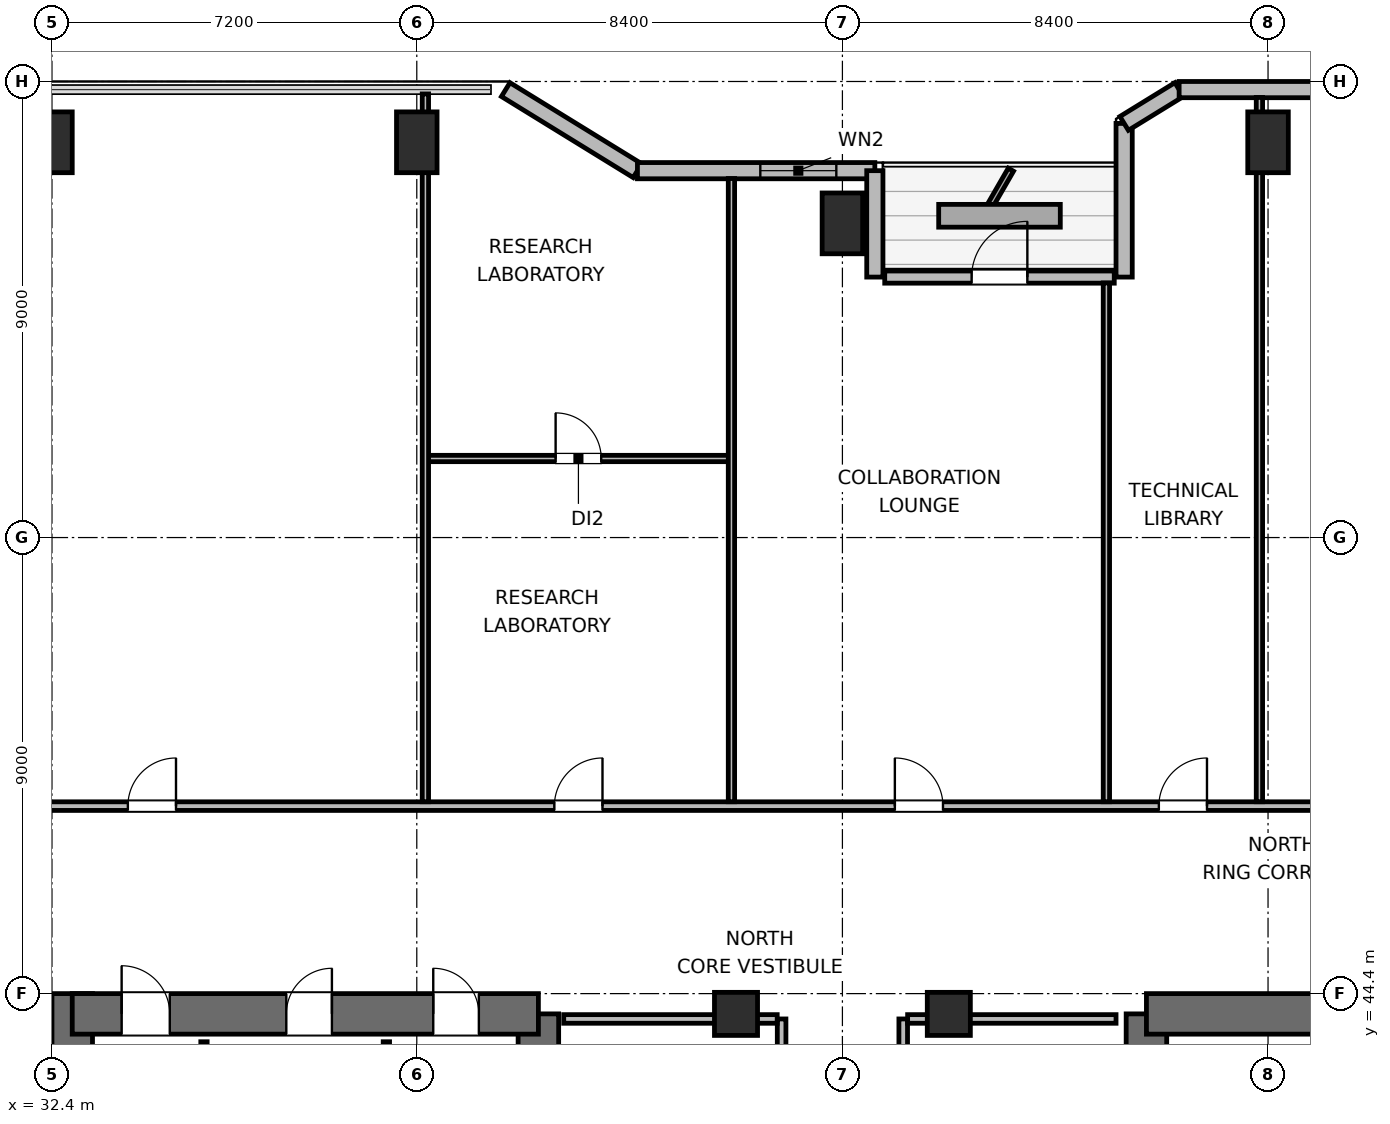
"""IFC4 building model, lengths in metres.
Left out: names, types, materials, properties, quantities, classifications, styles, units other than length and angle.
Written with IfcOpenShell. Run it as: python <this file> out.ifc"""

import sys

from ifc_helpers import new_model, si_unit, direction, frame, frame_2d, origin, origin_2d, place, context, subcontext, project, spatial, rectangle, extrude, element, fill, save


model = new_model("IFC4")
c1 = context("Model", 3, precision=1e-05, world=origin(), true_north=direction((0.0, 1.0)))
c2 = subcontext(c1, "Body", "Model", "MODEL_VIEW")
j1 = project(units=[si_unit("LENGTHUNIT", "METRE"), si_unit("PLANEANGLEUNIT", "RADIAN")], contexts=[c1])
p1 = place(None, origin())
s1 = spatial("IfcSite", under=j1, at=p1, CompositionType="ELEMENT")
p2 = place(p1, origin())
s2 = spatial("IfcBuilding", under=s1, at=p2, CompositionType="ELEMENT")
p3 = place(p2, frame((0.0, 0.0, 97.5)))
s3 = spatial("IfcBuildingStorey", under=s2, at=p3, CompositionType="ELEMENT", Elevation=97.5)
p4 = place(p3, frame((32.8, 27.6, 0.0), z_axis=(0.0, 0.0, 1.0), x_axis=(0.0, 1.0, 0.0)))
e1 = element("IfcWall", 1, at=p4, inside=s3, PredefinedType="SHEAR", context=c2, shape_type="SweptSolid", body=[
    extrude(rectangle(XDim=16.8, YDim=0.8, at=frame_2d((8.4, 0.0))), origin(), (0.0, 0.0, 1.0), 3.9),
])
p5 = place(p3, frame((42.0, 37.8, 0.0), z_axis=(0.0, 0.0, 1.0), x_axis=(0.0, 1.0, 0.0)))
e2 = element("IfcWall", 2, at=p5, inside=s3, PredefinedType="SHEAR", context=c2, shape_type="SweptSolid", body=[
    extrude(rectangle(XDim=6.2, YDim=0.8, at=frame_2d((3.1, 0.0))), origin(), (0.0, 0.0, 1.0), 3.9),
])
p6 = place(p3, frame((32.8, 44.0, 0.0), z_axis=(0.0, 0.0, 1.0), x_axis=(1.0, 0.0, 0.0)))
e3 = element("IfcWall", 3, at=p6, inside=s3, PredefinedType="SHEAR", context=c2, shape_type="SweptSolid", body=[
    extrude(rectangle(XDim=9.2, YDim=0.8, at=frame_2d((4.6, 0.0))), origin(), (0.0, 0.0, 1.0), 3.9),
])
p7 = place(p6, frame((0.975, 0.0, 0.0)))
e4 = element("IfcOpeningElement", 4, at=p7, cuts=e3, PredefinedType="OPENING", context=c2, shape_type="SweptSolid", body=[
    extrude(rectangle(XDim=0.95, YDim=2.04, at=frame_2d((0.475, 1.02))), frame((0.0, 0.41, 0.0), z_axis=(0.0, -1.0, 0.0), x_axis=(1.0, 0.0, 0.0)), (0.0, 0.0, 1.0), 0.82),
])
p8 = place(p6, frame((4.225, 0.0, 0.0)))
e5 = element("IfcOpeningElement", 5, at=p8, cuts=e3, PredefinedType="OPENING", context=c2, shape_type="SweptSolid", body=[
    extrude(rectangle(XDim=0.9, YDim=2.02, at=frame_2d((0.45, 1.01))), frame((0.0, 0.41, 0.0), z_axis=(0.0, -1.0, 0.0), x_axis=(1.0, 0.0, 0.0)), (0.0, 0.0, 1.0), 0.82),
])
p9 = place(p6, frame((7.125, 0.0, 0.0)))
e6 = element("IfcOpeningElement", 6, at=p9, cuts=e3, PredefinedType="OPENING", context=c2, shape_type="SweptSolid", body=[
    extrude(rectangle(XDim=0.9, YDim=2.02, at=frame_2d((0.45, 1.01))), frame((0.0, 0.41, 0.0), z_axis=(0.0, -1.0, 0.0), x_axis=(1.0, 0.0, 0.0)), (0.0, 0.0, 1.0), 0.82),
])
p10 = place(p3, frame((54.0, 38.0, 0.0), z_axis=(0.0, 0.0, 1.0), x_axis=(0.0, 1.0, 0.0)))
e7 = element("IfcWall", 7, at=p10, inside=s3, PredefinedType="SHEAR", context=c2, shape_type="SweptSolid", body=[
    extrude(rectangle(XDim=6.0, YDim=0.8, at=frame_2d((3.0, 0.0))), origin(), (0.0, 0.0, 1.0), 3.9),
])
p11 = place(p3, frame((54.0, 44.0, 0.0), z_axis=(0.0, 0.0, 1.0), x_axis=(1.0, 0.0, 0.0)))
e8 = element("IfcWall", 8, at=p11, inside=s3, PredefinedType="SHEAR", context=c2, shape_type="SweptSolid", body=[
    extrude(rectangle(XDim=9.2, YDim=0.8, at=frame_2d((4.6, 0.0))), origin(), (0.0, 0.0, 1.0), 3.9),
])
for number, where, z_axis, x_axis in (
    (9, (32.4, 61.2, 0.0), (0.0, 0.0, 1.0), (1.0, 0.0, 0.0)),
    (10, (39.6, 61.2, 0.0), (0.0, 0.0, 1.0), (1.0, 0.0, 0.0)),
    (11, (48.0, 59.6, 0.0), (0.0, 0.0, 1.0), (1.0, 0.0, 0.0)),
    (12, (56.4, 61.2, 0.0), (0.0, 0.0, 1.0), (1.0, 0.0, 0.0)),
):
    element("IfcColumn", number, at=place(p3, frame(where, z_axis=z_axis, x_axis=x_axis)), inside=s3, PredefinedType="COLUMN", context=c2, shape_type="SweptSolid", body=[
        extrude(rectangle(XDim=0.8, YDim=1.2, at=origin_2d()), origin(), (0.0, 0.0, 1.0), 3.9),
    ])
for number, where, z_axis, x_axis in (
    (13, (45.9, 44.0, 0.0), (0.0, 0.0, 1.0), (1.0, 0.0, 0.0)),
    (14, (50.1, 44.0, 0.0), (0.0, 0.0, 1.0), (1.0, 0.0, 0.0)),
):
    element("IfcColumn", number, at=place(p3, frame(where, z_axis=z_axis, x_axis=x_axis)), inside=s3, PredefinedType="COLUMN", context=c2, shape_type="SweptSolid", body=[
        extrude(rectangle(XDim=0.85, YDim=0.85, at=origin_2d()), origin(), (0.0, 0.0, 1.0), 3.9),
    ])
p12 = place(p3, frame((41.355, 62.24, 0.0), z_axis=(0.0, 0.0, 1.0), x_axis=(0.851630857047, -0.524142044989, 0.0)))
e15 = element("IfcWall", 15, at=p12, inside=s3, PredefinedType="SOLIDWALL", context=c2, shape_type="SweptSolid", body=[
    extrude(rectangle(XDim=3.053, YDim=0.32, at=frame_2d((1.526, 0.0))), origin(), (0.0, 0.0, 1.0), 2.875),
])
p13 = place(p3, frame((43.955, 60.64, 0.0), z_axis=(0.0, 0.0, 1.0), x_axis=(1.0, 0.0, 0.0)))
e16 = element("IfcWall", 16, at=p13, inside=s3, PredefinedType="SOLIDWALL", context=c2, shape_type="SweptSolid", body=[
    extrude(rectangle(XDim=4.685, YDim=0.32, at=frame_2d((2.343, 0.0))), origin(), (0.0, 0.0, 1.0), 2.875),
])
p14 = place(p13, frame((2.425, 0.0, 0.85)))
e17 = element("IfcOpeningElement", 17, at=p14, cuts=e16, PredefinedType="OPENING", context=c2, shape_type="SweptSolid", body=[
    extrude(rectangle(XDim=1.5, YDim=1.1, at=frame_2d((0.75, 0.55))), frame((0.0, 0.17, 0.0), z_axis=(0.0, -1.0, 0.0), x_axis=(1.0, 0.0, 0.0)), (0.0, 0.0, 1.0), 0.34),
])
p15 = place(p3, frame((48.64, 60.64, 0.0), z_axis=(0.0, 0.0, 1.0), x_axis=(0.0, -1.0, 0.0)))
e18 = element("IfcWall", 18, at=p15, inside=s3, PredefinedType="SOLIDWALL", context=c2, shape_type="SweptSolid", body=[
    extrude(rectangle(XDim=2.1, YDim=0.32, at=frame_2d((1.05, 0.0))), origin(), (0.0, 0.0, 1.0), 2.875),
])
p16 = place(p3, frame((48.835, 58.54, 0.0), z_axis=(0.0, 0.0, 1.0), x_axis=(1.0, 0.0, 0.0)))
e19 = element("IfcWall", 19, at=p16, inside=s3, PredefinedType="SOLIDWALL", context=c2, shape_type="SweptSolid", body=[
    extrude(rectangle(XDim=4.53, YDim=0.24, at=frame_2d((2.265, 0.0))), origin(), (0.0, 0.0, 1.0), 3.64),
])
p17 = place(p16, frame((1.715, 0.0, 0.0)))
e20 = element("IfcOpeningElement", 20, at=p17, cuts=e19, PredefinedType="OPENING", context=c2, shape_type="SweptSolid", body=[
    extrude(rectangle(XDim=1.1, YDim=2.04, at=frame_2d((0.55, 1.02))), frame((0.0, 0.13, 0.0), z_axis=(0.0, -1.0, 0.0), x_axis=(1.0, 0.0, 0.0)), (0.0, 0.0, 1.0), 0.26),
])
p18 = place(p3, frame((53.56, 58.54, 0.0), z_axis=(0.0, 0.0, 1.0), x_axis=(0.0, 1.0, 0.0)))
e21 = element("IfcWall", 21, at=p18, inside=s3, PredefinedType="SOLIDWALL", context=c2, shape_type="SweptSolid", body=[
    extrude(rectangle(XDim=3.032, YDim=0.32, at=frame_2d((1.516, 0.0))), origin(), (0.0, 0.0, 1.0), 2.875),
])
p19 = place(p3, frame((53.56, 61.573, 0.0), z_axis=(0.0, 0.0, 1.0), x_axis=(0.851776724646, 0.523904964045, 0.0)))
e22 = element("IfcWall", 22, at=p19, inside=s3, PredefinedType="SOLIDWALL", context=c2, shape_type="SweptSolid", body=[
    extrude(rectangle(XDim=1.274, YDim=0.32, at=frame_2d((0.637, 0.0))), origin(), (0.0, 0.0, 1.0), 3.64),
])
p20 = place(p3, frame((54.645, 62.24, 0.0), z_axis=(0.0, 0.0, 1.0), x_axis=(1.0, 0.0, 0.0)))
e23 = element("IfcWall", 23, at=p20, inside=s3, PredefinedType="SOLIDWALL", context=c2, shape_type="SweptSolid", body=[
    extrude(rectangle(XDim=10.734, YDim=0.32, at=frame_2d((5.367, 0.0))), origin(), (0.0, 0.0, 1.0), 3.64),
])
for number, where, z_axis, x_axis in (
    (24, (35.4, 41.095, 0.0), (0.0, 0.0, 1.0), (0.0, 1.0, 0.0)),
    (25, (39.0, 41.095, 0.0), (0.0, 0.0, 1.0), (0.0, 1.0, 0.0)),
):
    element("IfcWall", number, at=place(p3, frame(where, z_axis=z_axis, x_axis=x_axis)), inside=s3, PredefinedType="PARTITIONING", context=c2, shape_type="SweptSolid", body=[
        extrude(rectangle(XDim=2.355, YDim=0.125, at=frame_2d((1.177, 0.0))), origin(), (0.0, 0.0, 1.0), 3.64),
    ])
p21 = place(p3, frame((46.8, 37.9, 0.0), z_axis=(0.0, 0.0, 1.0), x_axis=(0.0, 1.0, 0.0)))
e26 = element("IfcWall", 26, at=p21, inside=s3, PredefinedType="PARTITIONING", context=c2, shape_type="SweptSolid", body=[
    extrude(rectangle(XDim=6.0, YDim=0.17, at=frame_2d((3.0, 0.0))), origin(), (0.0, 0.0, 1.0), 3.64),
])
p22 = place(p21, frame((0.54, 0.0, 0.0)))
e27 = element("IfcOpeningElement", 27, at=p22, cuts=e26, PredefinedType="OPENING", context=c2, shape_type="SweptSolid", body=[
    extrude(rectangle(XDim=0.9, YDim=2.02, at=frame_2d((0.45, 1.01))), frame((0.0, 0.095, 0.0), z_axis=(0.0, -1.0, 0.0), x_axis=(1.0, 0.0, 0.0)), (0.0, 0.0, 1.0), 0.19),
])
p23 = place(p21, frame((2.55, 0.0, 0.0)))
e28 = element("IfcOpeningElement", 28, at=p23, cuts=e26, PredefinedType="OPENING", context=c2, shape_type="SweptSolid", body=[
    extrude(rectangle(XDim=0.9, YDim=2.02, at=frame_2d((0.45, 1.01))), frame((0.0, 0.095, 0.0), z_axis=(0.0, -1.0, 0.0), x_axis=(1.0, 0.0, 0.0)), (0.0, 0.0, 1.0), 0.19),
])
p24 = place(p21, frame((4.56, 0.0, 0.0)))
e29 = element("IfcOpeningElement", 29, at=p24, cuts=e26, PredefinedType="OPENING", context=c2, shape_type="SweptSolid", body=[
    extrude(rectangle(XDim=0.9, YDim=2.02, at=frame_2d((0.45, 1.01))), frame((0.0, 0.095, 0.0), z_axis=(0.0, -1.0, 0.0), x_axis=(1.0, 0.0, 0.0)), (0.0, 0.0, 1.0), 0.19),
])
p25 = place(p3, frame((42.5, 43.9, 0.0), z_axis=(0.0, 0.0, 1.0), x_axis=(1.0, 0.0, 0.0)))
e30 = element("IfcWall", 30, at=p25, inside=s3, PredefinedType="PARTITIONING", context=c2, shape_type="SweptSolid", body=[
    extrude(rectangle(XDim=4.213, YDim=0.17, at=frame_2d((2.106, 0.0))), origin(), (0.0, 0.0, 1.0), 2.525),
])
p26 = place(p3, frame((49.2, 37.9, 0.0), z_axis=(0.0, 0.0, 1.0), x_axis=(0.0, 1.0, 0.0)))
e31 = element("IfcWall", 31, at=p26, inside=s3, PredefinedType="PARTITIONING", context=c2, shape_type="SweptSolid", body=[
    extrude(rectangle(XDim=6.0, YDim=0.17, at=frame_2d((3.0, 0.0))), origin(), (0.0, 0.0, 1.0), 3.64),
])
p27 = place(p26, frame((0.69, 0.0, 0.0)))
e32 = element("IfcOpeningElement", 32, at=p27, cuts=e31, PredefinedType="OPENING", context=c2, shape_type="SweptSolid", body=[
    extrude(rectangle(XDim=0.9, YDim=2.02, at=frame_2d((0.45, 1.01))), frame((0.0, 0.095, 0.0), z_axis=(0.0, -1.0, 0.0), x_axis=(1.0, 0.0, 0.0)), (0.0, 0.0, 1.0), 0.19),
])
p28 = place(p26, frame((3.69, 0.0, 0.0)))
e33 = element("IfcOpeningElement", 33, at=p28, cuts=e31, PredefinedType="OPENING", context=c2, shape_type="SweptSolid", body=[
    extrude(rectangle(XDim=0.9, YDim=2.02, at=frame_2d((0.45, 1.01))), frame((0.0, 0.095, 0.0), z_axis=(0.0, -1.0, 0.0), x_axis=(1.0, 0.0, 0.0)), (0.0, 0.0, 1.0), 0.19),
])
p29 = place(p3, frame((49.287, 43.9, 0.0), z_axis=(0.0, 0.0, 1.0), x_axis=(1.0, 0.0, 0.0)))
e34 = element("IfcWall", 34, at=p29, inside=s3, PredefinedType="PARTITIONING", context=c2, shape_type="SweptSolid", body=[
    extrude(rectangle(XDim=4.113, YDim=0.17, at=frame_2d((2.056, 0.0))), origin(), (0.0, 0.0, 1.0), 2.525),
])
p30 = place(p3, frame((28.975, 48.1, 0.0), z_axis=(0.0, 0.0, 1.0), x_axis=(1.0, 0.0, 0.0)))
e35 = element("IfcWall", 35, at=p30, inside=s3, PredefinedType="PARTITIONING", context=c2, shape_type="SweptSolid", body=[
    extrude(rectangle(XDim=38.05, YDim=0.17, at=frame_2d((19.025, 0.0))), origin(), (0.0, 0.0, 1.0), 3.64),
])
p31 = place(p30, frame((4.923, 0.0, 0.0)))
e36 = element("IfcOpeningElement", 36, at=p31, cuts=e35, PredefinedType="OPENING", context=c2, shape_type="SweptSolid", body=[
    extrude(rectangle(XDim=0.95, YDim=2.04, at=frame_2d((0.475, 1.02))), frame((0.0, 0.095, 0.0), z_axis=(0.0, -1.0, 0.0), x_axis=(1.0, 0.0, 0.0)), (0.0, 0.0, 1.0), 0.19),
])
p32 = place(p30, frame((13.34, 0.0, 0.0)))
e37 = element("IfcOpeningElement", 37, at=p32, cuts=e35, PredefinedType="OPENING", context=c2, shape_type="SweptSolid", body=[
    extrude(rectangle(XDim=0.95, YDim=2.04, at=frame_2d((0.475, 1.02))), frame((0.0, 0.095, 0.0), z_axis=(0.0, -1.0, 0.0), x_axis=(1.0, 0.0, 0.0)), (0.0, 0.0, 1.0), 0.19),
])
p33 = place(p30, frame((20.06, 0.0, 0.0)))
e38 = element("IfcOpeningElement", 38, at=p33, cuts=e35, PredefinedType="OPENING", context=c2, shape_type="SweptSolid", body=[
    extrude(rectangle(XDim=0.95, YDim=2.04, at=frame_2d((0.475, 1.02))), frame((0.0, 0.095, 0.0), z_axis=(0.0, -1.0, 0.0), x_axis=(1.0, 0.0, 0.0)), (0.0, 0.0, 1.0), 0.19),
])
p34 = place(p30, frame((25.27, 0.0, 0.0)))
e39 = element("IfcOpeningElement", 39, at=p34, cuts=e35, PredefinedType="OPENING", context=c2, shape_type="SweptSolid", body=[
    extrude(rectangle(XDim=0.95, YDim=2.04, at=frame_2d((0.475, 1.02))), frame((0.0, 0.095, 0.0), z_axis=(0.0, -1.0, 0.0), x_axis=(1.0, 0.0, 0.0)), (0.0, 0.0, 1.0), 0.19),
])
p35 = place(p30, frame((32.178, 0.0, 0.0)))
e40 = element("IfcOpeningElement", 40, at=p35, cuts=e35, PredefinedType="OPENING", context=c2, shape_type="SweptSolid", body=[
    extrude(rectangle(XDim=0.95, YDim=2.04, at=frame_2d((0.475, 1.02))), frame((0.0, 0.095, 0.0), z_axis=(0.0, -1.0, 0.0), x_axis=(1.0, 0.0, 0.0)), (0.0, 0.0, 1.0), 0.19),
])
p36 = place(p3, frame((39.77, 54.96, 0.0), z_axis=(0.0, 0.0, 1.0), x_axis=(1.0, 0.0, 0.0)))
e41 = element("IfcWall", 41, at=p36, inside=s3, PredefinedType="PARTITIONING", context=c2, shape_type="SweptSolid", body=[
    extrude(rectangle(XDim=6.04, YDim=0.125, at=frame_2d((3.02, 0.0))), origin(), (0.0, 0.0, 1.0), 3.64),
])
p37 = place(p36, frame((2.57, 0.0, 0.0)))
e42 = element("IfcOpeningElement", 42, at=p37, cuts=e41, PredefinedType="OPENING", context=c2, shape_type="SweptSolid", body=[
    extrude(rectangle(XDim=0.9, YDim=2.02, at=frame_2d((0.45, 1.01))), frame((0.0, 0.073, 0.0), z_axis=(0.0, -1.0, 0.0), x_axis=(1.0, 0.0, 0.0)), (0.0, 0.0, 1.0), 0.145),
])
p38 = place(p3, frame((39.77, 48.187, 0.0), z_axis=(0.0, 0.0, 1.0), x_axis=(0.0, 1.0, 0.0)))
e43 = element("IfcWall", 43, at=p38, inside=s3, PredefinedType="PARTITIONING", context=c2, shape_type="SweptSolid", body=[
    extrude(rectangle(XDim=13.968, YDim=0.125, at=frame_2d((6.984, 0.0))), origin(), (0.0, 0.0, 1.0), 3.003),
])
p39 = place(p3, frame((45.81, 48.187, 0.0), z_axis=(0.0, 0.0, 1.0), x_axis=(0.0, 1.0, 0.0)))
e44 = element("IfcWall", 44, at=p39, inside=s3, PredefinedType="PARTITIONING", context=c2, shape_type="SweptSolid", body=[
    extrude(rectangle(XDim=12.298, YDim=0.125, at=frame_2d((6.149, 0.0))), origin(), (0.0, 0.0, 1.0), 3.64),
])
p40 = place(p3, frame((53.21, 48.187, 0.0), z_axis=(0.0, 0.0, 1.0), x_axis=(0.0, 1.0, 0.0)))
e45 = element("IfcWall", 45, at=p40, inside=s3, PredefinedType="PARTITIONING", context=c2, shape_type="SweptSolid", body=[
    extrude(rectangle(XDim=10.238, YDim=0.125, at=frame_2d((5.119, 0.0))), origin(), (0.0, 0.0, 1.0), 3.003),
])
p41 = place(p3, frame((56.23, 48.187, 0.0), z_axis=(0.0, 0.0, 1.0), x_axis=(0.0, 1.0, 0.0)))
e46 = element("IfcWall", 46, at=p41, inside=s3, PredefinedType="PARTITIONING", context=c2, shape_type="SweptSolid", body=[
    extrude(rectangle(XDim=13.898, YDim=0.125, at=frame_2d((6.949, 0.0))), origin(), (0.0, 0.0, 1.0), 3.003),
])
p42 = place(p14, origin())
e47 = element("IfcWindow", 47, at=p42, inside=s3, PartitioningType="SINGLE_PANEL", PredefinedType="WINDOW", context=c2, shape_type="SweptSolid", body=[
    extrude(rectangle(XDim=1.5, YDim=1.1, at=frame_2d((0.75, 0.55))), frame((0.0, 0.03, 0.0), z_axis=(0.0, -1.0, 0.0), x_axis=(1.0, 0.0, 0.0)), (0.0, 0.0, 1.0), 0.06),
])
fill(e17, e47)
p43 = place(p17, origin())
e48 = element("IfcDoor", 48, at=p43, inside=s3, OperationType="SINGLE_SWING_RIGHT", PredefinedType="DOOR", context=c2, shape_type="SweptSolid", body=[
    extrude(rectangle(XDim=1.1, YDim=2.04, at=frame_2d((0.55, 1.02))), frame((0.0, 0.025, 0.0), z_axis=(0.0, -1.0, 0.0), x_axis=(1.0, 0.0, 0.0)), (0.0, 0.0, 1.0), 0.05),
])
fill(e20, e48)
p44 = place(p7, origin())
e49 = element("IfcDoor", 49, at=p44, inside=s3, OperationType="SINGLE_SWING_LEFT", PredefinedType="DOOR", context=c2, shape_type="SweptSolid", body=[
    extrude(rectangle(XDim=0.95, YDim=2.04, at=frame_2d((0.475, 1.02))), frame((0.0, 0.025, 0.0), z_axis=(0.0, -1.0, 0.0), x_axis=(1.0, 0.0, 0.0)), (0.0, 0.0, 1.0), 0.05),
])
fill(e4, e49)
p45 = place(p8, origin())
e50 = element("IfcDoor", 50, at=p45, inside=s3, OperationType="SINGLE_SWING_RIGHT", PredefinedType="DOOR", context=c2, shape_type="SweptSolid", body=[
    extrude(rectangle(XDim=0.9, YDim=2.02, at=frame_2d((0.45, 1.01))), frame((0.0, 0.025, 0.0), z_axis=(0.0, -1.0, 0.0), x_axis=(1.0, 0.0, 0.0)), (0.0, 0.0, 1.0), 0.05),
])
fill(e5, e50)
p46 = place(p9, origin())
e51 = element("IfcDoor", 51, at=p46, inside=s3, OperationType="SINGLE_SWING_LEFT", PredefinedType="DOOR", context=c2, shape_type="SweptSolid", body=[
    extrude(rectangle(XDim=0.9, YDim=2.02, at=frame_2d((0.45, 1.01))), frame((0.0, 0.025, 0.0), z_axis=(0.0, -1.0, 0.0), x_axis=(1.0, 0.0, 0.0)), (0.0, 0.0, 1.0), 0.05),
])
fill(e6, e51)
p47 = place(p31, origin())
e52 = element("IfcDoor", 52, at=p47, inside=s3, OperationType="SINGLE_SWING_RIGHT", PredefinedType="DOOR", context=c2, shape_type="SweptSolid", body=[
    extrude(rectangle(XDim=0.95, YDim=2.04, at=frame_2d((0.475, 1.02))), frame((0.0, 0.025, 0.0), z_axis=(0.0, -1.0, 0.0), x_axis=(1.0, 0.0, 0.0)), (0.0, 0.0, 1.0), 0.05),
])
fill(e36, e52)
p48 = place(p37, origin())
e53 = element("IfcDoor", 53, at=p48, inside=s3, OperationType="SINGLE_SWING_LEFT", PredefinedType="DOOR", context=c2, shape_type="SweptSolid", body=[
    extrude(rectangle(XDim=0.9, YDim=2.02, at=frame_2d((0.45, 1.01))), frame((0.0, 0.025, 0.0), z_axis=(0.0, -1.0, 0.0), x_axis=(1.0, 0.0, 0.0)), (0.0, 0.0, 1.0), 0.05),
])
fill(e42, e53)
p49 = place(p32, origin())
e54 = element("IfcDoor", 54, at=p49, inside=s3, OperationType="SINGLE_SWING_RIGHT", PredefinedType="DOOR", context=c2, shape_type="SweptSolid", body=[
    extrude(rectangle(XDim=0.95, YDim=2.04, at=frame_2d((0.475, 1.02))), frame((0.0, 0.025, 0.0), z_axis=(0.0, -1.0, 0.0), x_axis=(1.0, 0.0, 0.0)), (0.0, 0.0, 1.0), 0.05),
])
fill(e37, e54)
p50 = place(p33, origin())
e55 = element("IfcDoor", 55, at=p50, inside=s3, OperationType="SINGLE_SWING_LEFT", PredefinedType="DOOR", context=c2, shape_type="SweptSolid", body=[
    extrude(rectangle(XDim=0.95, YDim=2.04, at=frame_2d((0.475, 1.02))), frame((0.0, 0.025, 0.0), z_axis=(0.0, -1.0, 0.0), x_axis=(1.0, 0.0, 0.0)), (0.0, 0.0, 1.0), 0.05),
])
fill(e38, e55)
p51 = place(p34, origin())
e56 = element("IfcDoor", 56, at=p51, inside=s3, OperationType="SINGLE_SWING_RIGHT", PredefinedType="DOOR", context=c2, shape_type="SweptSolid", body=[
    extrude(rectangle(XDim=0.95, YDim=2.04, at=frame_2d((0.475, 1.02))), frame((0.0, 0.025, 0.0), z_axis=(0.0, -1.0, 0.0), x_axis=(1.0, 0.0, 0.0)), (0.0, 0.0, 1.0), 0.05),
])
fill(e39, e56)
save(model, sys.argv[1])
